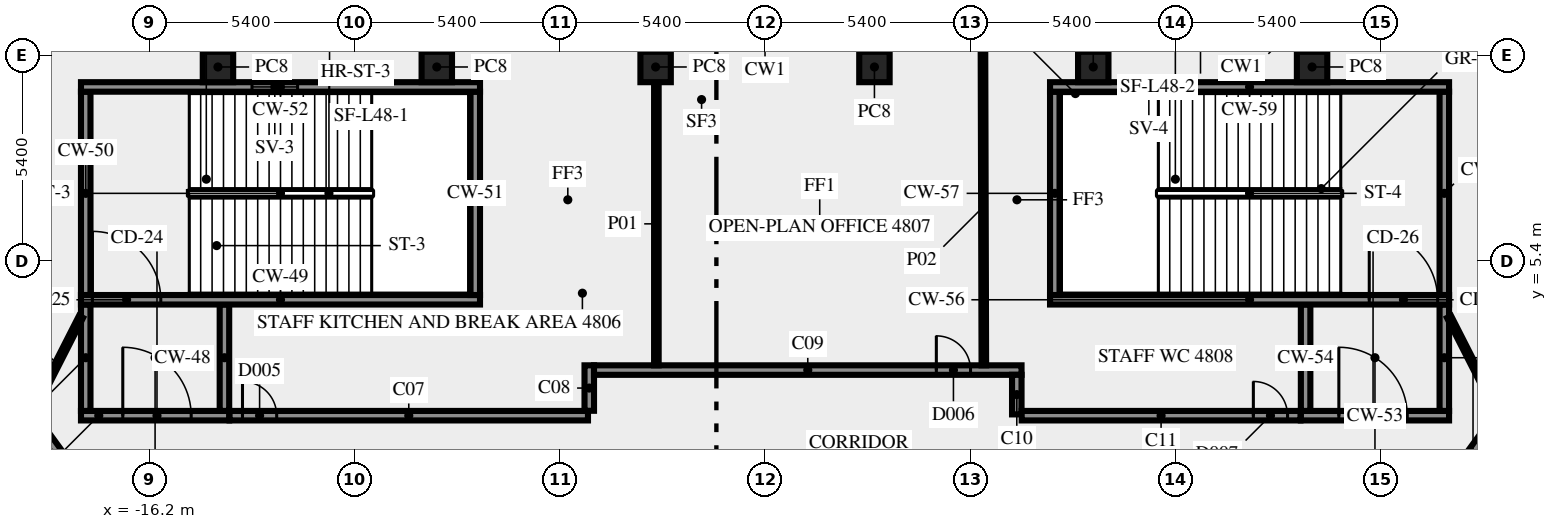
"""IFC4 building model, lengths in metres.
Left out: names, types, materials, properties, quantities, classifications, styles, units other than length and angle.
Written with IfcOpenShell. Run it as: python <this file> out.ifc"""

import sys

from ifc_helpers import new_model, si_unit, direction, frame, frame_2d, origin, origin_2d, place, context, subcontext, project, spatial, rectangle, extrude, element, fill, save


model = new_model("IFC4")
c1 = context("Model", 3, precision=1e-05, world=origin(), true_north=direction((0.0, 1.0)))
c2 = subcontext(c1, "Body", "Model", "MODEL_VIEW")
j1 = project(units=[si_unit("LENGTHUNIT", "METRE"), si_unit("PLANEANGLEUNIT", "RADIAN")], contexts=[c1])
p1 = place(None, origin())
s1 = spatial("IfcSite", under=j1, at=p1, CompositionType="ELEMENT")
p2 = place(p1, origin())
s2 = spatial("IfcBuilding", under=s1, at=p2, CompositionType="ELEMENT")
p3 = place(p2, frame((0.0, 0.0, 206.0)))
s3 = spatial("IfcBuildingStorey", under=s2, at=p3, CompositionType="ELEMENT", Elevation=206.0)
for number, where, z_axis, x_axis in (
    (1, (14.395, 10.5, 0.0), (0.0, 0.0, 1.0), (-1.0, 0.0, 0.0)),
    (2, (8.637, 10.5, 0.0), (0.0, 0.0, 1.0), (-1.0, 0.0, 0.0)),
    (3, (2.879, 10.5, 0.0), (0.0, 0.0, 1.0), (-1.0, 0.0, 0.0)),
    (4, (-2.879, 10.5, 0.0), (0.0, 0.0, 1.0), (-1.0, 0.0, 0.0)),
    (5, (-8.637, 10.5, 0.0), (0.0, 0.0, 1.0), (-1.0, 0.0, 0.0)),
    (6, (-14.395, 10.5, 0.0), (0.0, 0.0, 1.0), (-1.0, 0.0, 0.0)),
):
    element("IfcColumn", number, at=place(p3, frame(where, z_axis=z_axis, x_axis=x_axis)), inside=s3, PredefinedType="COLUMN", context=c2, shape_type="SweptSolid", body=[
        extrude(rectangle(XDim=0.8, YDim=0.8, at=origin_2d()), origin(), (0.0, 0.0, 1.0), 3.65),
    ])
p4 = place(p3, frame((-18.0, 1.325, 0.0), z_axis=(0.0, 0.0, 1.0), x_axis=(1.0, 0.0, 0.0)))
e7 = element("IfcWall", 7, at=p4, inside=s3, PredefinedType="SHEAR", context=c2, shape_type="SweptSolid", body=[
    extrude(rectangle(XDim=3.9, YDim=0.25, at=frame_2d((1.95, 0.0))), origin(), (0.0, 0.0, 1.0), 3.65),
])
p5 = place(p4, frame((1.1, 0.0, 0.0)))
e8 = element("IfcOpeningElement", 8, at=p5, cuts=e7, PredefinedType="OPENING", context=c2, shape_type="SweptSolid", body=[
    extrude(rectangle(XDim=1.8, YDim=2.1, at=frame_2d((0.9, 1.05))), frame((0.0, 0.135, 0.0), z_axis=(0.0, -1.0, 0.0), x_axis=(1.0, 0.0, 0.0)), (0.0, 0.0, 1.0), 0.27),
])
for number, where, z_axis, x_axis in (
    (9, (-17.875, 1.45, 0.0), (0.0, 0.0, 1.0), (0.0, 1.0, 0.0)),
    (10, (-14.225, 1.45, 0.0), (0.0, 0.0, 1.0), (0.0, 1.0, 0.0)),
):
    element("IfcWall", number, at=place(p3, frame(where, z_axis=z_axis, x_axis=x_axis)), inside=s3, PredefinedType="SHEAR", context=c2, shape_type="SweptSolid", body=[
        extrude(rectangle(XDim=2.8, YDim=0.25, at=frame_2d((1.4, 0.0))), origin(), (0.0, 0.0, 1.0), 3.65),
    ])
p6 = place(p3, frame((-18.0, 4.375, 0.0), z_axis=(0.0, 0.0, 1.0), x_axis=(1.0, 0.0, 0.0)))
e11 = element("IfcWall", 11, at=p6, inside=s3, PredefinedType="SHEAR", context=c2, shape_type="SweptSolid", body=[
    extrude(rectangle(XDim=10.5, YDim=0.25, at=frame_2d((5.25, 0.0))), origin(), (0.0, 0.0, 1.0), 3.65),
])
p7 = place(p6, frame((0.3, 0.0, 0.0)))
e12 = element("IfcOpeningElement", 12, at=p7, cuts=e11, PredefinedType="OPENING", context=c2, shape_type="SweptSolid", body=[
    extrude(rectangle(XDim=1.8, YDim=2.1, at=frame_2d((0.9, 1.05))), frame((0.0, 0.135, 0.0), z_axis=(0.0, -1.0, 0.0), x_axis=(1.0, 0.0, 0.0)), (0.0, 0.0, 1.0), 0.27),
])
for number, where, z_axis, x_axis in (
    (13, (-17.875, 4.5, 0.0), (0.0, 0.0, 1.0), (0.0, 1.0, 0.0)),
    (14, (-7.625, 4.5, 0.0), (0.0, 0.0, 1.0), (0.0, 1.0, 0.0)),
):
    element("IfcWall", number, at=place(p3, frame(where, z_axis=z_axis, x_axis=x_axis)), inside=s3, PredefinedType="SHEAR", context=c2, shape_type="SweptSolid", body=[
        extrude(rectangle(XDim=5.35, YDim=0.25, at=frame_2d((2.675, 0.0))), origin(), (0.0, 0.0, 1.0), 3.65),
    ])
p8 = place(p3, frame((-18.0, 9.975, 0.0), z_axis=(0.0, 0.0, 1.0), x_axis=(1.0, 0.0, 0.0)))
e15 = element("IfcWall", 15, at=p8, inside=s3, PredefinedType="SHEAR", context=c2, shape_type="SweptSolid", body=[
    extrude(rectangle(XDim=10.5, YDim=0.25, at=frame_2d((5.25, 0.0))), origin(), (0.0, 0.0, 1.0), 3.65),
])
p9 = place(p8, frame((4.5, 0.0, 1.0)))
e16 = element("IfcOpeningElement", 16, at=p9, cuts=e15, PredefinedType="OPENING", context=c2, shape_type="SweptSolid", body=[
    extrude(rectangle(XDim=1.2, YDim=1.2, at=frame_2d((0.6, 0.6))), frame((0.0, 0.135, 0.0), z_axis=(0.0, -1.0, 0.0), x_axis=(1.0, 0.0, 0.0)), (0.0, 0.0, 1.0), 0.27),
])
p10 = place(p3, frame((14.1, 1.325, 0.0), z_axis=(0.0, 0.0, 1.0), x_axis=(1.0, 0.0, 0.0)))
e17 = element("IfcWall", 17, at=p10, inside=s3, PredefinedType="SHEAR", context=c2, shape_type="SweptSolid", body=[
    extrude(rectangle(XDim=3.9, YDim=0.25, at=frame_2d((1.95, 0.0))), origin(), (0.0, 0.0, 1.0), 3.65),
])
p11 = place(p10, frame((1.0, 0.0, 0.0)))
e18 = element("IfcOpeningElement", 18, at=p11, cuts=e17, PredefinedType="OPENING", context=c2, shape_type="SweptSolid", body=[
    extrude(rectangle(XDim=1.8, YDim=2.1, at=frame_2d((0.9, 1.05))), frame((0.0, 0.135, 0.0), z_axis=(0.0, -1.0, 0.0), x_axis=(1.0, 0.0, 0.0)), (0.0, 0.0, 1.0), 0.27),
])
for number, where, z_axis, x_axis in (
    (19, (14.225, 1.45, 0.0), (0.0, 0.0, 1.0), (0.0, 1.0, 0.0)),
    (20, (17.875, 1.45, 0.0), (0.0, 0.0, 1.0), (0.0, 1.0, 0.0)),
):
    element("IfcWall", number, at=place(p3, frame(where, z_axis=z_axis, x_axis=x_axis)), inside=s3, PredefinedType="SHEAR", context=c2, shape_type="SweptSolid", body=[
        extrude(rectangle(XDim=2.8, YDim=0.25, at=frame_2d((1.4, 0.0))), origin(), (0.0, 0.0, 1.0), 3.65),
    ])
p12 = place(p3, frame((7.5, 4.375, 0.0), z_axis=(0.0, 0.0, 1.0), x_axis=(1.0, 0.0, 0.0)))
e21 = element("IfcWall", 21, at=p12, inside=s3, PredefinedType="SHEAR", context=c2, shape_type="SweptSolid", body=[
    extrude(rectangle(XDim=10.5, YDim=0.25, at=frame_2d((5.25, 0.0))), origin(), (0.0, 0.0, 1.0), 3.65),
])
p13 = place(p12, frame((8.4, 0.0, 0.0)))
e22 = element("IfcOpeningElement", 22, at=p13, cuts=e21, PredefinedType="OPENING", context=c2, shape_type="SweptSolid", body=[
    extrude(rectangle(XDim=1.8, YDim=2.1, at=frame_2d((0.9, 1.05))), frame((0.0, 0.135, 0.0), z_axis=(0.0, -1.0, 0.0), x_axis=(1.0, 0.0, 0.0)), (0.0, 0.0, 1.0), 0.27),
])
for number, where, z_axis, x_axis in (
    (23, (7.625, 4.5, 0.0), (0.0, 0.0, 1.0), (0.0, 1.0, 0.0)),
    (24, (17.875, 4.5, 0.0), (0.0, 0.0, 1.0), (0.0, 1.0, 0.0)),
):
    element("IfcWall", number, at=place(p3, frame(where, z_axis=z_axis, x_axis=x_axis)), inside=s3, PredefinedType="SHEAR", context=c2, shape_type="SweptSolid", body=[
        extrude(rectangle(XDim=5.35, YDim=0.25, at=frame_2d((2.675, 0.0))), origin(), (0.0, 0.0, 1.0), 3.65),
    ])
p14 = place(p3, frame((7.5, 9.975, 0.0), z_axis=(0.0, 0.0, 1.0), x_axis=(1.0, 0.0, 0.0)))
e25 = element("IfcWall", 25, at=p14, inside=s3, PredefinedType="SHEAR", context=c2, shape_type="SweptSolid", body=[
    extrude(rectangle(XDim=10.5, YDim=0.25, at=frame_2d((5.25, 0.0))), origin(), (0.0, 0.0, 1.0), 3.65),
])
p15 = place(p14, frame((2.0, 0.0, 1.0)))
e26 = element("IfcOpeningElement", 26, at=p15, cuts=e25, PredefinedType="OPENING", context=c2, shape_type="SweptSolid", body=[
    extrude(rectangle(XDim=1.2, YDim=1.2, at=frame_2d((0.6, 0.6))), frame((0.0, 0.135, 0.0), z_axis=(0.0, -1.0, 0.0), x_axis=(1.0, 0.0, 0.0)), (0.0, 0.0, 1.0), 0.27),
])
p16 = place(p3, frame((17.545, -1.125, 0.0), z_axis=(0.0, 0.0, 1.0), x_axis=(0.58779555165, 0.809009511354, 0.0)))
e27 = element("IfcWall", 27, at=p16, inside=s3, PredefinedType="SOLIDWALL", context=c2, shape_type="SweptSolid", body=[
    extrude(rectangle(XDim=18.103, YDim=0.25, at=frame_2d((9.052, 0.0))), origin(), (0.0, 0.0, 1.0), 3.65),
])
p17 = place(p16, frame((16.728, 0.0, 0.0)))
e28 = element("IfcOpeningElement", 28, at=p17, cuts=e27, PredefinedType="OPENING", context=c2, shape_type="SweptSolid", body=[
    extrude(rectangle(XDim=0.9, YDim=2.1, at=frame_2d((0.45, 1.05))), frame((0.0, 0.135, 0.0), z_axis=(0.0, -1.0, 0.0), x_axis=(1.0, 0.0, 0.0)), (0.0, 0.0, 1.0), 0.27),
])
p18 = place(p3, frame((-31.918, 18.658, 0.0), z_axis=(0.0, 0.0, 1.0), x_axis=(0.587788731405, -0.80901446664, 0.0)))
e29 = element("IfcWall", 29, at=p18, inside=s3, PredefinedType="SOLIDWALL", context=c2, shape_type="SweptSolid", body=[
    extrude(rectangle(XDim=24.453, YDim=0.25, at=frame_2d((12.227, 0.0))), origin(), (0.0, 0.0, 1.0), 3.65),
])
p19 = place(p18, frame((20.112, 0.0, 0.0)))
e30 = element("IfcOpeningElement", 30, at=p19, cuts=e29, PredefinedType="OPENING", context=c2, shape_type="SweptSolid", body=[
    extrude(rectangle(XDim=0.9, YDim=2.1, at=frame_2d((0.45, 1.05))), frame((0.0, 0.135, 0.0), z_axis=(0.0, -1.0, 0.0), x_axis=(1.0, 0.0, 0.0)), (0.0, 0.0, 1.0), 0.27),
])
p20 = place(p18, frame((4.445, 0.0, 0.0)))
e31 = element("IfcOpeningElement", 31, at=p20, cuts=e29, PredefinedType="OPENING", context=c2, shape_type="SweptSolid", body=[
    extrude(rectangle(XDim=0.9, YDim=2.1, at=frame_2d((0.45, 1.05))), frame((0.0, 0.135, 0.0), z_axis=(0.0, -1.0, 0.0), x_axis=(1.0, 0.0, 0.0)), (0.0, 0.0, 1.0), 0.27),
])
p21 = place(p3, frame((-14.09, 1.325, 0.0), z_axis=(0.0, 0.0, 1.0), x_axis=(1.0, 0.0, 0.0)))
e32 = element("IfcWall", 32, at=p21, inside=s3, PredefinedType="SOLIDWALL", context=c2, shape_type="SweptSolid", body=[
    extrude(rectangle(XDim=9.431, YDim=0.25, at=frame_2d((4.716, 0.0))), origin(), (0.0, 0.0, 1.0), 3.65),
])
p22 = place(p21, frame((0.34, 0.0, 0.0)))
e33 = element("IfcOpeningElement", 33, at=p22, cuts=e32, PredefinedType="OPENING", context=c2, shape_type="SweptSolid", body=[
    extrude(rectangle(XDim=0.9, YDim=2.1, at=frame_2d((0.45, 1.05))), frame((0.0, 0.135, 0.0), z_axis=(0.0, -1.0, 0.0), x_axis=(1.0, 0.0, 0.0)), (0.0, 0.0, 1.0), 0.27),
])
p23 = place(p3, frame((-4.625, 1.454, 0.0), z_axis=(0.0, 0.0, 1.0), x_axis=(0.0, 1.0, 0.0)))
e34 = element("IfcWall", 34, at=p23, inside=s3, PredefinedType="SOLIDWALL", context=c2, shape_type="SweptSolid", body=[
    extrude(rectangle(XDim=1.196, YDim=0.25, at=frame_2d((0.598, 0.0))), origin(), (0.0, 0.0, 1.0), 3.65),
])
p24 = place(p3, frame((-4.5, 2.525, 0.0), z_axis=(0.0, 0.0, 1.0), x_axis=(1.0, 0.0, 0.0)))
e35 = element("IfcWall", 35, at=p24, inside=s3, PredefinedType="SOLIDWALL", context=c2, shape_type="SweptSolid", body=[
    extrude(rectangle(XDim=11.25, YDim=0.25, at=frame_2d((5.625, 0.0))), origin(), (0.0, 0.0, 1.0), 3.65),
])
p25 = place(p24, frame((9.008, 0.0, 0.0)))
e36 = element("IfcOpeningElement", 36, at=p25, cuts=e35, PredefinedType="OPENING", context=c2, shape_type="SweptSolid", body=[
    extrude(rectangle(XDim=0.9, YDim=2.1, at=frame_2d((0.45, 1.05))), frame((0.0, 0.135, 0.0), z_axis=(0.0, -1.0, 0.0), x_axis=(1.0, 0.0, 0.0)), (0.0, 0.0, 1.0), 0.27),
])
p26 = place(p3, frame((6.625, 2.4, 0.0), z_axis=(0.0, 0.0, 1.0), x_axis=(0.0, -1.0, 0.0)))
e37 = element("IfcWall", 37, at=p26, inside=s3, PredefinedType="SOLIDWALL", context=c2, shape_type="SweptSolid", body=[
    extrude(rectangle(XDim=1.041, YDim=0.25, at=frame_2d((0.521, 0.0))), origin(), (0.0, 0.0, 1.0), 3.65),
])
p27 = place(p3, frame((6.754, 1.325, 0.0), z_axis=(0.0, 0.0, 1.0), x_axis=(1.0, 0.0, 0.0)))
e38 = element("IfcWall", 38, at=p27, inside=s3, PredefinedType="SOLIDWALL", context=c2, shape_type="SweptSolid", body=[
    extrude(rectangle(XDim=7.336, YDim=0.25, at=frame_2d((3.668, 0.0))), origin(), (0.0, 0.0, 1.0), 3.65),
])
p28 = place(p27, frame((6.096, 0.0, 0.0)))
e39 = element("IfcOpeningElement", 39, at=p28, cuts=e38, PredefinedType="OPENING", context=c2, shape_type="SweptSolid", body=[
    extrude(rectangle(XDim=0.9, YDim=2.1, at=frame_2d((0.45, 1.05))), frame((0.0, 0.135, 0.0), z_axis=(0.0, -1.0, 0.0), x_axis=(1.0, 0.0, 0.0)), (0.0, 0.0, 1.0), 0.27),
])
p29 = place(p3, frame((-2.859, 10.095, 0.0), z_axis=(0.0, 0.0, 1.0), x_axis=(0.0, -1.0, 0.0)))
e40 = element("IfcWall", 40, at=p29, inside=s3, PredefinedType="PARTITIONING", context=c2, shape_type="SweptSolid", body=[
    extrude(rectangle(XDim=7.445, YDim=0.12, at=frame_2d((3.723, 0.0))), origin(), (0.0, 0.0, 1.0), 3.65),
])
p30 = place(p3, frame((5.758, 2.65, 0.0), z_axis=(0.0, 0.0, 1.0), x_axis=(-0.002748366908, 0.999996223233, 0.0)))
e41 = element("IfcWall", 41, at=p30, inside=s3, PredefinedType="PARTITIONING", context=c2, shape_type="SweptSolid", body=[
    extrude(rectangle(XDim=8.35, YDim=0.12, at=frame_2d((4.175, 0.0))), origin(), (0.0, 0.0, 1.0), 2.85),
])
for number, where, z_axis, x_axis in (
    (42, (-19.261, 1.45, 0.0), (0.0, 0.0, 1.0), (0.454, 0.891, 0.0)),
    (43, (18.0, 3.925, 0.0), (0.0, 0.0, 1.0), (0.454, -0.891, 0.0)),
):
    element("IfcWall", number, at=place(p3, frame(where, z_axis=z_axis, x_axis=x_axis)), inside=s3, PredefinedType="PARTITIONING", context=c2, shape_type="SweptSolid", body=[
        extrude(rectangle(XDim=2.778, YDim=0.12, at=frame_2d((1.389, 0.0))), origin(), (0.0, 0.0, 1.0), 3.65),
    ])
p31 = place(p5, origin())
e44 = element("IfcDoor", 44, at=p31, inside=s3, OperationType="DOUBLE_DOOR_SINGLE_SWING", PredefinedType="DOOR", context=c2, shape_type="SweptSolid", body=[
    extrude(rectangle(XDim=1.8, YDim=2.1, at=frame_2d((0.9, 1.05))), frame((0.0, 0.025, 0.0), z_axis=(0.0, -1.0, 0.0), x_axis=(1.0, 0.0, 0.0)), (0.0, 0.0, 1.0), 0.05),
])
fill(e8, e44)
p32 = place(p7, origin())
e45 = element("IfcDoor", 45, at=p32, inside=s3, OperationType="DOUBLE_DOOR_SINGLE_SWING", PredefinedType="DOOR", context=c2, shape_type="SweptSolid", body=[
    extrude(rectangle(XDim=1.8, YDim=2.1, at=frame_2d((0.9, 1.05))), frame((0.0, 0.025, 0.0), z_axis=(0.0, -1.0, 0.0), x_axis=(1.0, 0.0, 0.0)), (0.0, 0.0, 1.0), 0.05),
])
fill(e12, e45)
p33 = place(p9, origin())
e46 = element("IfcWindow", 46, at=p33, inside=s3, PartitioningType="SINGLE_PANEL", PredefinedType="WINDOW", context=c2, shape_type="SweptSolid", body=[
    extrude(rectangle(XDim=1.2, YDim=1.2, at=frame_2d((0.6, 0.6))), frame((0.0, 0.03, 0.0), z_axis=(0.0, -1.0, 0.0), x_axis=(1.0, 0.0, 0.0)), (0.0, 0.0, 1.0), 0.06),
])
fill(e16, e46)
p34 = place(p11, origin())
e47 = element("IfcDoor", 47, at=p34, inside=s3, OperationType="DOUBLE_DOOR_SINGLE_SWING", PredefinedType="DOOR", context=c2, shape_type="SweptSolid", body=[
    extrude(rectangle(XDim=1.8, YDim=2.1, at=frame_2d((0.9, 1.05))), frame((0.0, 0.025, 0.0), z_axis=(0.0, -1.0, 0.0), x_axis=(1.0, 0.0, 0.0)), (0.0, 0.0, 1.0), 0.05),
])
fill(e18, e47)
p35 = place(p13, origin())
e48 = element("IfcDoor", 48, at=p35, inside=s3, OperationType="DOUBLE_DOOR_SINGLE_SWING", PredefinedType="DOOR", context=c2, shape_type="SweptSolid", body=[
    extrude(rectangle(XDim=1.8, YDim=2.1, at=frame_2d((0.9, 1.05))), frame((0.0, 0.025, 0.0), z_axis=(0.0, -1.0, 0.0), x_axis=(1.0, 0.0, 0.0)), (0.0, 0.0, 1.0), 0.05),
])
fill(e22, e48)
p36 = place(p15, origin())
e49 = element("IfcWindow", 49, at=p36, inside=s3, PartitioningType="SINGLE_PANEL", PredefinedType="WINDOW", context=c2, shape_type="SweptSolid", body=[
    extrude(rectangle(XDim=1.2, YDim=1.2, at=frame_2d((0.6, 0.6))), frame((0.0, 0.03, 0.0), z_axis=(0.0, -1.0, 0.0), x_axis=(1.0, 0.0, 0.0)), (0.0, 0.0, 1.0), 0.06),
])
fill(e26, e49)
p37 = place(p25, origin())
e50 = element("IfcDoor", 50, at=p37, inside=s3, OperationType="SINGLE_SWING_RIGHT", PredefinedType="DOOR", context=c2, shape_type="SweptSolid", body=[
    extrude(rectangle(XDim=0.9, YDim=2.1, at=frame_2d((0.45, 1.05))), frame((0.0, 0.025, 0.0), z_axis=(0.0, -1.0, 0.0), x_axis=(1.0, 0.0, 0.0)), (0.0, 0.0, 1.0), 0.05),
])
fill(e36, e50)
p38 = place(p22, origin())
e51 = element("IfcDoor", 51, at=p38, inside=s3, OperationType="SINGLE_SWING_LEFT", PredefinedType="DOOR", context=c2, shape_type="SweptSolid", body=[
    extrude(rectangle(XDim=0.9, YDim=2.1, at=frame_2d((0.45, 1.05))), frame((0.0, 0.025, 0.0), z_axis=(0.0, -1.0, 0.0), x_axis=(1.0, 0.0, 0.0)), (0.0, 0.0, 1.0), 0.05),
])
fill(e33, e51)
p39 = place(p28, origin())
e52 = element("IfcDoor", 52, at=p39, inside=s3, OperationType="SINGLE_SWING_RIGHT", PredefinedType="DOOR", context=c2, shape_type="SweptSolid", body=[
    extrude(rectangle(XDim=0.9, YDim=2.1, at=frame_2d((0.45, 1.05))), frame((0.0, 0.025, 0.0), z_axis=(0.0, -1.0, 0.0), x_axis=(1.0, 0.0, 0.0)), (0.0, 0.0, 1.0), 0.05),
])
fill(e39, e52)
save(model, sys.argv[1])
